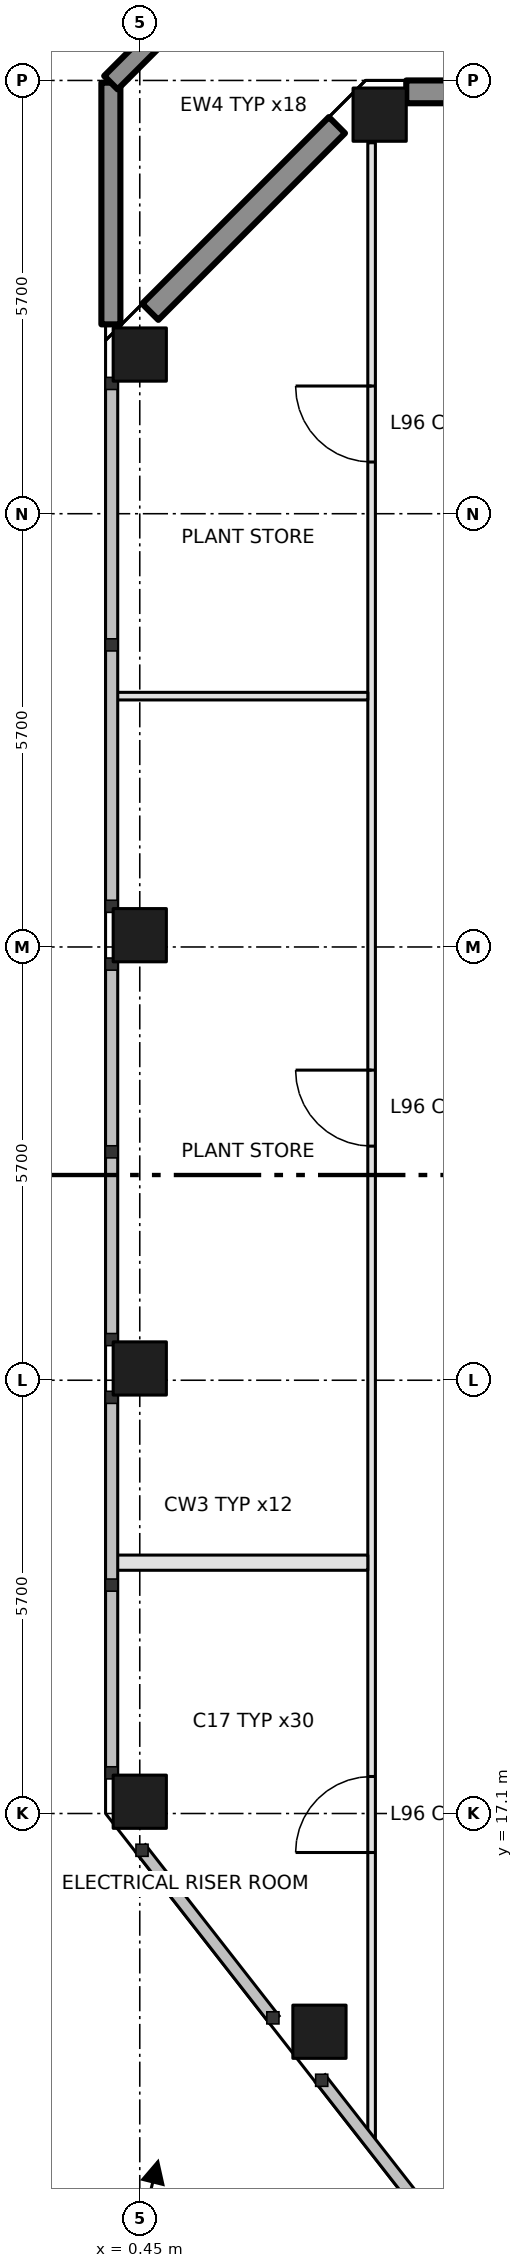
"""IFC4 building model, lengths in metres.
Left out: names, types, materials, properties, quantities, classifications, styles, units other than length and angle.
Written with IfcOpenShell. Run it as: python <this file> out.ifc"""

import sys

from ifc_helpers import new_model, si_unit, direction, frame, frame_2d, origin, origin_2d, place, context, subcontext, project, spatial, rectangle, extrude, element, fill, save


model = new_model("IFC4")
c1 = context("Model", 3, precision=1e-05, world=origin(), true_north=direction((0.0, 1.0)))
c2 = subcontext(c1, "Body", "Model", "MODEL_VIEW")
j1 = project(units=[si_unit("LENGTHUNIT", "METRE"), si_unit("PLANEANGLEUNIT", "RADIAN")], contexts=[c1])
p1 = place(None, origin())
s1 = spatial("IfcSite", under=j1, at=p1, CompositionType="ELEMENT")
p2 = place(p1, origin())
s2 = spatial("IfcBuilding", under=s1, at=p2, CompositionType="ELEMENT")
p3 = place(p2, frame((0.0, 0.0, 419.4)))
s3 = spatial("IfcBuildingStorey", under=s2, at=p3, CompositionType="ELEMENT", Elevation=419.4)
for number, where, z_axis, x_axis in (
    (1, (3.606, 39.45, 0.0), (0.0, 0.0, 1.0), (1.0, 0.0, 0.0)),
    (2, (0.45, 36.294, 0.0), (0.0, 0.0, 1.0), (1.0, 0.0, 0.0)),
    (3, (0.45, 17.255, 0.0), (0.0, 0.0, 1.0), (1.0, 0.0, 0.0)),
    (4, (0.45, 22.955, 0.0), (0.0, 0.0, 1.0), (1.0, 0.0, 0.0)),
    (5, (0.45, 28.655, 0.0), (0.0, 0.0, 1.0), (1.0, 0.0, 0.0)),
    (6, (2.814, 14.229, 0.0), (0.0, 0.0, 1.0), (1.0, 0.0, 0.0)),
):
    element("IfcColumn", number, at=place(p3, frame(where, z_axis=z_axis, x_axis=x_axis)), inside=s3, PredefinedType="COLUMN", context=c2, shape_type="SweptSolid", body=[
        extrude(rectangle(XDim=0.7, YDim=0.7, at=origin_2d()), origin(), (0.0, 0.0, 1.0), 4.8),
    ])
p4 = place(p3, frame((3.5, 12.753, 0.0), z_axis=(0.0, 0.0, 1.0), x_axis=(0.0, 1.0, 0.0)))
e7 = element("IfcWall", 7, at=p4, inside=s3, PredefinedType="PARTITIONING", context=c2, shape_type="SweptSolid", body=[
    extrude(rectangle(XDim=26.327, YDim=0.1, at=frame_2d((13.164, 0.0))), origin(), (0.0, 0.0, 1.0), 4.5),
])
p5 = place(p4, frame((3.834, 0.0, 0.0)))
e8 = element("IfcOpeningElement", 8, at=p5, cuts=e7, PredefinedType="OPENING", context=c2, shape_type="SweptSolid", body=[
    extrude(rectangle(XDim=1.0, YDim=2.1, at=frame_2d((0.5, 1.05))), frame((0.0, 0.06, 0.0), z_axis=(0.0, -1.0, 0.0), x_axis=(1.0, 0.0, 0.0)), (0.0, 0.0, 1.0), 0.12),
])
p6 = place(p4, frame((13.127, 0.0, 0.0)))
e9 = element("IfcOpeningElement", 9, at=p6, cuts=e7, PredefinedType="OPENING", context=c2, shape_type="SweptSolid", body=[
    extrude(rectangle(XDim=1.0, YDim=2.1, at=frame_2d((0.5, 1.05))), frame((0.0, 0.06, 0.0), z_axis=(0.0, -1.0, 0.0), x_axis=(1.0, 0.0, 0.0)), (0.0, 0.0, 1.0), 0.12),
])
p7 = place(p4, frame((22.127, 0.0, 0.0)))
e10 = element("IfcOpeningElement", 10, at=p7, cuts=e7, PredefinedType="OPENING", context=c2, shape_type="SweptSolid", body=[
    extrude(rectangle(XDim=1.0, YDim=2.1, at=frame_2d((0.5, 1.05))), frame((0.0, 0.06, 0.0), z_axis=(0.0, -1.0, 0.0), x_axis=(1.0, 0.0, 0.0)), (0.0, 0.0, 1.0), 0.12),
])
p8 = place(p3, frame((3.45, 20.4, 0.0), z_axis=(0.0, 0.0, 1.0), x_axis=(-1.0, 0.0, 0.0)))
e11 = element("IfcWall", 11, at=p8, inside=s3, PredefinedType="PARTITIONING", context=c2, shape_type="SweptSolid", body=[
    extrude(rectangle(XDim=3.376, YDim=0.2, at=frame_2d((1.688, 0.0))), origin(), (0.0, 0.0, 1.0), 4.5),
])
p9 = place(p3, frame((3.45, 31.8, 0.0), z_axis=(0.0, 0.0, 1.0), x_axis=(-1.0, 0.0, 0.0)))
e12 = element("IfcWall", 12, at=p9, inside=s3, PredefinedType="PARTITIONING", context=c2, shape_type="SweptSolid", body=[
    extrude(rectangle(XDim=3.376, YDim=0.1, at=frame_2d((1.688, 0.0))), origin(), (0.0, 0.0, 1.0), 4.5),
])
p10 = place(p3, frame((0.07, 36.691, 0.0), z_axis=(0.0, 0.0, 1.0), x_axis=(0.0, 1.0, 0.0)))
e13 = element("IfcWall", 13, at=p10, inside=s3, PredefinedType="PARAPET", context=c2, shape_type="SweptSolid", body=[
    extrude(rectangle(XDim=3.18, YDim=0.25, at=frame_2d((1.59, 0.0))), origin(), (0.0, 0.0, 1.0), 1.2),
])
p11 = place(p3, frame((0.07, 39.871, 0.0), z_axis=(0.0, 0.0, 1.0), x_axis=(0.707106781187, 0.707106781187, 0.0)))
e14 = element("IfcWall", 14, at=p11, inside=s3, PredefinedType="PARAPET", context=c2, shape_type="SweptSolid", body=[
    extrude(rectangle(XDim=4.779, YDim=0.25, at=frame_2d((2.389, 0.0))), origin(), (0.0, 0.0, 1.0), 1.2),
])
p12 = place(p3, frame((8.956, 39.75, 0.0), z_axis=(0.0, 0.0, 1.0), x_axis=(-1.0, 0.0, 0.0)))
e15 = element("IfcWall", 15, at=p12, inside=s3, PredefinedType="SOLIDWALL", context=c2, shape_type="SweptSolid", body=[
    extrude(rectangle(XDim=5.0, YDim=0.3, at=frame_2d((2.5, 0.0))), origin(), (0.0, 0.0, 1.0), 3.85),
])
p13 = place(p3, frame((3.044, 39.312, 0.0), z_axis=(0.0, 0.0, 1.0), x_axis=(-0.707106781187, -0.707106781187, 0.0)))
e16 = element("IfcWall", 16, at=p13, inside=s3, PredefinedType="SOLIDWALL", context=c2, shape_type="SweptSolid", body=[
    extrude(rectangle(XDim=3.473, YDim=0.3, at=frame_2d((1.737, 0.0))), origin(), (0.0, 0.0, 1.0), 3.85),
])
p14 = place(p5, origin())
e17 = element("IfcDoor", 17, at=p14, inside=s3, OperationType="SINGLE_SWING_LEFT", PredefinedType="DOOR", context=c2, shape_type="SweptSolid", body=[
    extrude(rectangle(XDim=1.0, YDim=2.1, at=frame_2d((0.5, 1.05))), frame((0.0, 0.025, 0.0), z_axis=(0.0, -1.0, 0.0), x_axis=(1.0, 0.0, 0.0)), (0.0, 0.0, 1.0), 0.05),
])
fill(e8, e17)
p15 = place(p6, origin())
e18 = element("IfcDoor", 18, at=p15, inside=s3, OperationType="SINGLE_SWING_RIGHT", PredefinedType="DOOR", context=c2, shape_type="SweptSolid", body=[
    extrude(rectangle(XDim=1.0, YDim=2.1, at=frame_2d((0.5, 1.05))), frame((0.0, 0.025, 0.0), z_axis=(0.0, -1.0, 0.0), x_axis=(1.0, 0.0, 0.0)), (0.0, 0.0, 1.0), 0.05),
])
fill(e9, e18)
p16 = place(p7, origin())
e19 = element("IfcDoor", 19, at=p16, inside=s3, OperationType="SINGLE_SWING_RIGHT", PredefinedType="DOOR", context=c2, shape_type="SweptSolid", body=[
    extrude(rectangle(XDim=1.0, YDim=2.1, at=frame_2d((0.5, 1.05))), frame((0.0, 0.025, 0.0), z_axis=(0.0, -1.0, 0.0), x_axis=(1.0, 0.0, 0.0)), (0.0, 0.0, 1.0), 0.05),
])
fill(e10, e19)
save(model, sys.argv[1])
